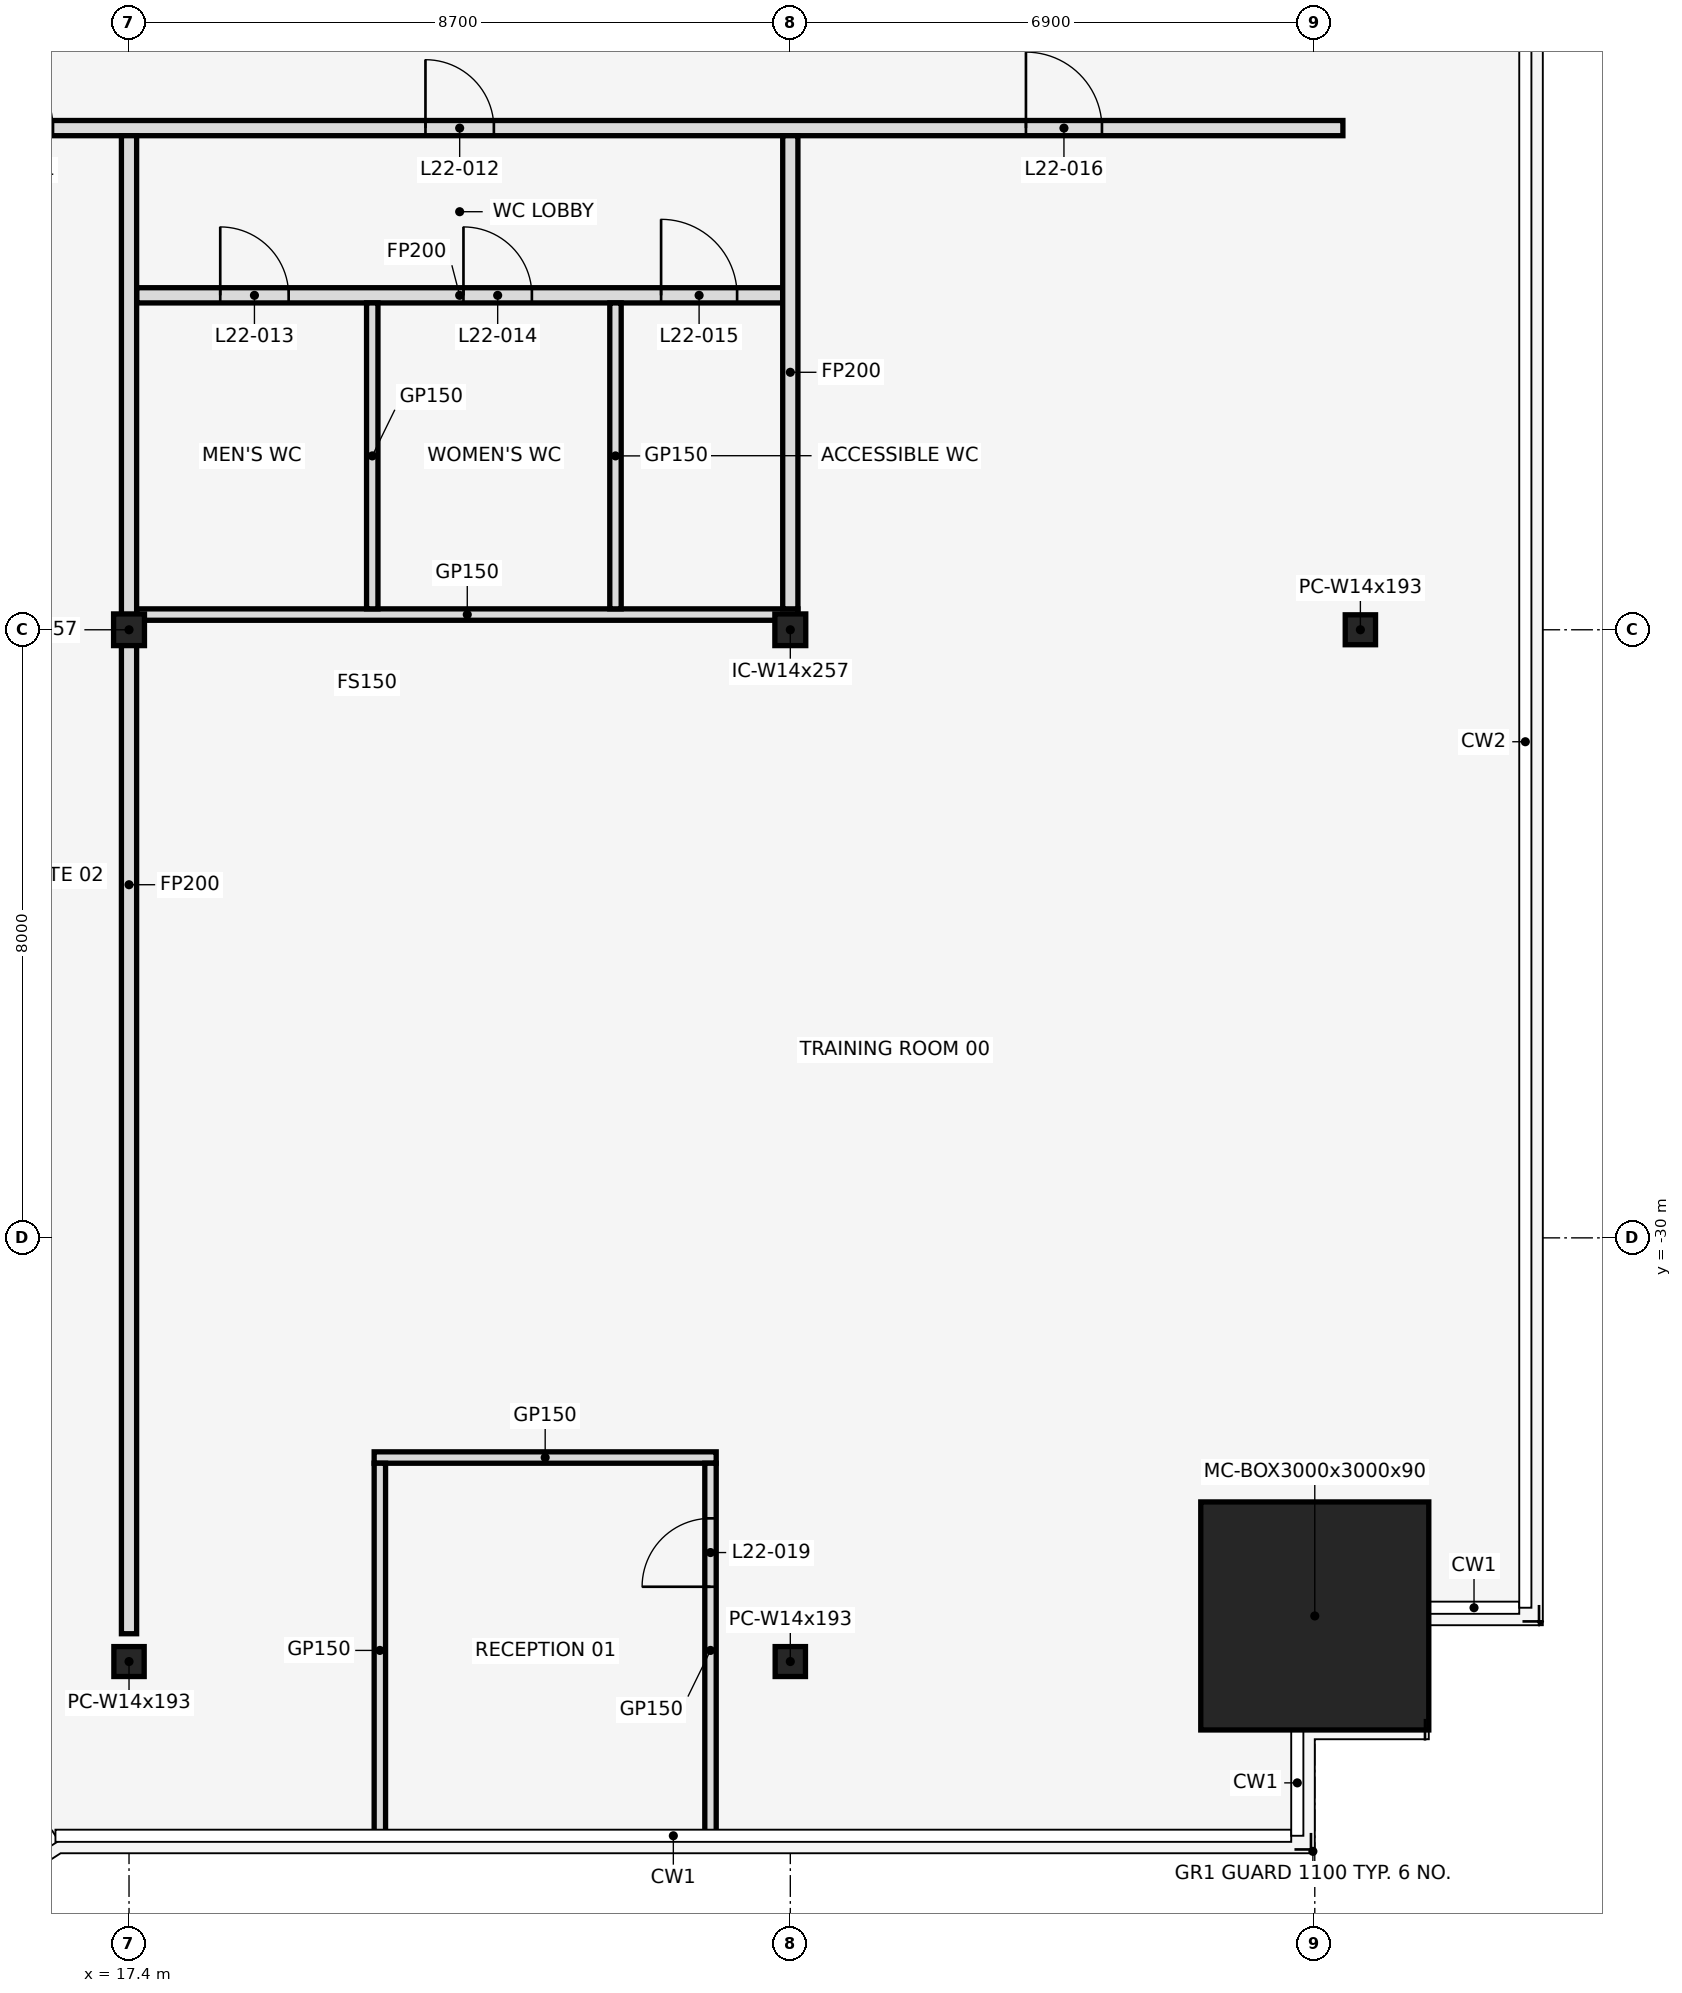
"""IFC4 building model, lengths in metres.
Left out: names, types, materials, properties, quantities, classifications, styles, units other than length and angle.
Written with IfcOpenShell. Run it as: python <this file> out.ifc"""

import sys

from ifc_helpers import new_model, si_unit, direction, frame, frame_2d, origin, origin_2d, place, context, subcontext, project, spatial, rectangle, hollow_rectangle, i_section, extrude, element, fill, save


model = new_model("IFC4")
c1 = context("Model", 3, precision=1e-05, world=origin(), true_north=direction((0.0, 1.0)))
c2 = subcontext(c1, "Body", "Model", "MODEL_VIEW")
j1 = project(units=[si_unit("LENGTHUNIT", "METRE"), si_unit("PLANEANGLEUNIT", "RADIAN")], contexts=[c1])
p1 = place(None, origin())
s1 = spatial("IfcSite", under=j1, at=p1, CompositionType="ELEMENT")
p2 = place(p1, origin())
s2 = spatial("IfcBuilding", under=s1, at=p2, CompositionType="ELEMENT")
p3 = place(p2, frame((0.0, 0.0, 106.3)))
s3 = spatial("IfcBuildingStorey", under=s2, at=p3, CompositionType="ELEMENT", Elevation=106.3)
for number, where, z_axis, x_axis in (
    (1, (17.4, -35.574, 0.0), (0.0, 0.0, 1.0), (1.0, 0.0, 0.0)),
    (2, (26.1, -35.574, 0.0), (0.0, 0.0, 1.0), (1.0, 0.0, 0.0)),
):
    element("IfcColumn", number, at=place(p3, frame(where, z_axis=z_axis, x_axis=x_axis)), inside=s3, PredefinedType="COLUMN", context=c2, shape_type="SweptSolid", body=[
        extrude(i_section(OverallWidth=0.399, OverallDepth=0.394, WebThickness=0.023, FlangeThickness=0.037, at=origin_2d()), origin(), (0.0, 0.0, 1.0), 4.1),
    ])
p4 = place(p3, frame((33.0, -34.974, 0.0), z_axis=(0.0, 0.0, 1.0), x_axis=(1.0, 0.0, 0.0)))
e3 = element("IfcColumn", 3, at=p4, inside=s3, PredefinedType="COLUMN", context=c2, shape_type="SweptSolid", body=[
    extrude(hollow_rectangle(XDim=3.0, YDim=3.0, WallThickness=0.09, at=origin_2d()), origin(), (0.0, 0.0, 1.0), 4.1),
])
p5 = place(p3, frame((33.6, -22.0, 0.0), z_axis=(0.0, 0.0, 1.0), x_axis=(1.0, 0.0, 0.0)))
e4 = element("IfcColumn", 4, at=p5, inside=s3, PredefinedType="COLUMN", context=c2, shape_type="SweptSolid", body=[
    extrude(i_section(OverallWidth=0.399, OverallDepth=0.394, WebThickness=0.023, FlangeThickness=0.037, at=origin_2d()), origin(), (0.0, 0.0, 1.0), 4.1),
])
for number, where, z_axis, x_axis in (
    (5, (17.4, -22.0, 0.0), (0.0, 0.0, 1.0), (1.0, 0.0, 0.0)),
    (6, (26.1, -22.0, 0.0), (0.0, 0.0, 1.0), (1.0, 0.0, 0.0)),
):
    element("IfcColumn", number, at=place(p3, frame(where, z_axis=z_axis, x_axis=x_axis)), inside=s3, PredefinedType="COLUMN", context=c2, shape_type="SweptSolid", body=[
        extrude(i_section(OverallWidth=0.406, OverallDepth=0.417, WebThickness=0.03, FlangeThickness=0.048, at=origin_2d()), origin(), (0.0, 0.0, 1.0), 4.1),
    ])
p6 = place(p3, frame((20.625, -32.89, 0.0), z_axis=(0.0, 0.0, 1.0), x_axis=(1.0, 0.0, 0.0)))
e7 = element("IfcWall", 7, at=p6, inside=s3, PredefinedType="PARTITIONING", context=c2, shape_type="SweptSolid", body=[
    extrude(rectangle(XDim=4.5, YDim=0.15, at=frame_2d((2.25, 0.0))), origin(), (0.0, 0.0, 1.0), 3.018),
])
p7 = place(p3, frame((17.5, -21.8, 0.0), z_axis=(0.0, 0.0, 1.0), x_axis=(1.0, 0.0, 0.0)))
e8 = element("IfcWall", 8, at=p7, inside=s3, PredefinedType="PARTITIONING", context=c2, shape_type="SweptSolid", body=[
    extrude(rectangle(XDim=8.7, YDim=0.15, at=frame_2d((4.35, 0.0))), origin(), (0.0, 0.0, 1.0), 3.018),
])
p8 = place(p3, frame((17.5, -17.6, 0.0), z_axis=(0.0, 0.0, 1.0), x_axis=(1.0, 0.0, 0.0)))
e9 = element("IfcWall", 9, at=p8, inside=s3, PredefinedType="PARTITIONING", context=c2, shape_type="SweptSolid", body=[
    extrude(rectangle(XDim=8.5, YDim=0.2, at=frame_2d((4.25, 0.0))), origin(), (0.0, 0.0, 1.0), 3.018),
])
p9 = place(p8, frame((1.1, 0.0, 0.0)))
e10 = element("IfcOpeningElement", 10, at=p9, cuts=e9, PredefinedType="OPENING", context=c2, shape_type="SweptSolid", body=[
    extrude(rectangle(XDim=0.9, YDim=2.1, at=frame_2d((0.45, 1.05))), frame((0.0, 0.112, 0.0), z_axis=(0.0, -1.0, 0.0), x_axis=(1.0, 0.0, 0.0)), (0.0, 0.0, 1.0), 0.224),
])
p10 = place(p8, frame((4.3, 0.0, 0.0)))
e11 = element("IfcOpeningElement", 11, at=p10, cuts=e9, PredefinedType="OPENING", context=c2, shape_type="SweptSolid", body=[
    extrude(rectangle(XDim=0.9, YDim=2.1, at=frame_2d((0.45, 1.05))), frame((0.0, 0.112, 0.0), z_axis=(0.0, -1.0, 0.0), x_axis=(1.0, 0.0, 0.0)), (0.0, 0.0, 1.0), 0.224),
])
p11 = place(p8, frame((6.9, 0.0, 0.0)))
e12 = element("IfcOpeningElement", 12, at=p11, cuts=e9, PredefinedType="OPENING", context=c2, shape_type="SweptSolid", body=[
    extrude(rectangle(XDim=1.0, YDim=2.1, at=frame_2d((0.5, 1.05))), frame((0.0, 0.112, 0.0), z_axis=(0.0, -1.0, 0.0), x_axis=(1.0, 0.0, 0.0)), (0.0, 0.0, 1.0), 0.224),
])
p12 = place(p3, frame((-33.37, -15.4, 0.0), z_axis=(0.0, 0.0, 1.0), x_axis=(1.0, 0.0, 0.0)))
e13 = element("IfcWall", 13, at=p12, inside=s3, PredefinedType="PARTITIONING", context=c2, shape_type="SweptSolid", body=[
    extrude(rectangle(XDim=66.74, YDim=0.2, at=frame_2d((33.37, 0.0))), origin(), (0.0, 0.0, 1.0), 3.018),
])
p13 = place(p12, frame((4.2, 0.0, 0.0)))
e14 = element("IfcOpeningElement", 14, at=p13, cuts=e13, PredefinedType="OPENING", context=c2, shape_type="SweptSolid", body=[
    extrude(rectangle(XDim=1.8, YDim=2.1, at=frame_2d((0.9, 1.05))), frame((0.0, 0.112, 0.0), z_axis=(0.0, -1.0, 0.0), x_axis=(1.0, 0.0, 0.0)), (0.0, 0.0, 1.0), 0.224),
])
p14 = place(p12, frame((15.47, 0.0, 0.0)))
e15 = element("IfcOpeningElement", 15, at=p14, cuts=e13, PredefinedType="OPENING", context=c2, shape_type="SweptSolid", body=[
    extrude(rectangle(XDim=1.0, YDim=2.1, at=frame_2d((0.5, 1.05))), frame((0.0, 0.112, 0.0), z_axis=(0.0, -1.0, 0.0), x_axis=(1.0, 0.0, 0.0)), (0.0, 0.0, 1.0), 0.224),
])
p15 = place(p12, frame((27.07, 0.0, 0.0)))
e16 = element("IfcOpeningElement", 16, at=p15, cuts=e13, PredefinedType="OPENING", context=c2, shape_type="SweptSolid", body=[
    extrude(rectangle(XDim=1.0, YDim=2.1, at=frame_2d((0.5, 1.05))), frame((0.0, 0.112, 0.0), z_axis=(0.0, -1.0, 0.0), x_axis=(1.0, 0.0, 0.0)), (0.0, 0.0, 1.0), 0.224),
])
p16 = place(p12, frame((39.67, 0.0, 0.0)))
e17 = element("IfcOpeningElement", 17, at=p16, cuts=e13, PredefinedType="OPENING", context=c2, shape_type="SweptSolid", body=[
    extrude(rectangle(XDim=1.8, YDim=2.1, at=frame_2d((0.9, 1.05))), frame((0.0, 0.112, 0.0), z_axis=(0.0, -1.0, 0.0), x_axis=(1.0, 0.0, 0.0)), (0.0, 0.0, 1.0), 0.224),
])
p17 = place(p12, frame((48.77, 0.0, 0.0)))
e18 = element("IfcOpeningElement", 18, at=p17, cuts=e13, PredefinedType="OPENING", context=c2, shape_type="SweptSolid", body=[
    extrude(rectangle(XDim=1.0, YDim=2.1, at=frame_2d((0.5, 1.05))), frame((0.0, 0.112, 0.0), z_axis=(0.0, -1.0, 0.0), x_axis=(1.0, 0.0, 0.0)), (0.0, 0.0, 1.0), 0.224),
])
p18 = place(p12, frame((54.67, 0.0, 0.0)))
e19 = element("IfcOpeningElement", 19, at=p18, cuts=e13, PredefinedType="OPENING", context=c2, shape_type="SweptSolid", body=[
    extrude(rectangle(XDim=0.9, YDim=2.1, at=frame_2d((0.45, 1.05))), frame((0.0, 0.112, 0.0), z_axis=(0.0, -1.0, 0.0), x_axis=(1.0, 0.0, 0.0)), (0.0, 0.0, 1.0), 0.224),
])
p19 = place(p12, frame((62.57, 0.0, 0.0)))
e20 = element("IfcOpeningElement", 20, at=p19, cuts=e13, PredefinedType="OPENING", context=c2, shape_type="SweptSolid", body=[
    extrude(rectangle(XDim=1.0, YDim=2.1, at=frame_2d((0.5, 1.05))), frame((0.0, 0.112, 0.0), z_axis=(0.0, -1.0, 0.0), x_axis=(1.0, 0.0, 0.0)), (0.0, 0.0, 1.0), 0.224),
])
p20 = place(p3, frame((17.4, -35.208, 0.0), z_axis=(0.0, 0.0, 1.0), x_axis=(0.0, 1.0, 0.0)))
e21 = element("IfcWall", 21, at=p20, inside=s3, PredefinedType="PARTITIONING", context=c2, shape_type="SweptSolid", body=[
    extrude(rectangle(XDim=19.708, YDim=0.2, at=frame_2d((9.854, 0.0))), origin(), (0.0, 0.0, 1.0), 3.018),
])
p21 = place(p3, frame((20.6, -21.725, 0.0), z_axis=(0.0, 0.0, 1.0), x_axis=(0.0, 1.0, 0.0)))
e22 = element("IfcWall", 22, at=p21, inside=s3, PredefinedType="PARTITIONING", context=c2, shape_type="SweptSolid", body=[
    extrude(rectangle(XDim=4.025, YDim=0.15, at=frame_2d((2.013, 0.0))), origin(), (0.0, 0.0, 1.0), 3.018),
])
p22 = place(p3, frame((20.7, -37.89, 0.0), z_axis=(0.0, 0.0, 1.0), x_axis=(0.0, 1.0, 0.0)))
e23 = element("IfcWall", 23, at=p22, inside=s3, PredefinedType="PARTITIONING", context=c2, shape_type="SweptSolid", body=[
    extrude(rectangle(XDim=4.925, YDim=0.15, at=frame_2d((2.462, 0.0))), origin(), (0.0, 0.0, 1.0), 3.018),
])
p23 = place(p3, frame((23.8, -21.725, 0.0), z_axis=(0.0, 0.0, 1.0), x_axis=(0.0, 1.0, 0.0)))
e24 = element("IfcWall", 24, at=p23, inside=s3, PredefinedType="PARTITIONING", context=c2, shape_type="SweptSolid", body=[
    extrude(rectangle(XDim=4.025, YDim=0.15, at=frame_2d((2.013, 0.0))), origin(), (0.0, 0.0, 1.0), 3.018),
])
p24 = place(p3, frame((25.05, -37.89, 0.0), z_axis=(0.0, 0.0, 1.0), x_axis=(0.0, 1.0, 0.0)))
e25 = element("IfcWall", 25, at=p24, inside=s3, PredefinedType="PARTITIONING", context=c2, shape_type="SweptSolid", body=[
    extrude(rectangle(XDim=4.925, YDim=0.15, at=frame_2d((2.462, 0.0))), origin(), (0.0, 0.0, 1.0), 3.018),
])
p25 = place(p24, frame((3.3, 0.0, 0.0)))
e26 = element("IfcOpeningElement", 26, at=p25, cuts=e25, PredefinedType="OPENING", context=c2, shape_type="SweptSolid", body=[
    extrude(rectangle(XDim=0.9, YDim=2.1, at=frame_2d((0.45, 1.05))), frame((0.0, 0.087, 0.0), z_axis=(0.0, -1.0, 0.0), x_axis=(1.0, 0.0, 0.0)), (0.0, 0.0, 1.0), 0.174),
])
p26 = place(p3, frame((26.1, -21.725, 0.0), z_axis=(0.0, 0.0, 1.0), x_axis=(0.0, 1.0, 0.0)))
e27 = element("IfcWall", 27, at=p26, inside=s3, PredefinedType="PARTITIONING", context=c2, shape_type="SweptSolid", body=[
    extrude(rectangle(XDim=6.225, YDim=0.2, at=frame_2d((3.113, 0.0))), origin(), (0.0, 0.0, 1.0), 3.018),
])
p27 = place(p18, frame((0.9, 0.0, 0.0), z_axis=(0.0, 0.0, 1.0), x_axis=(-1.0, 0.0, 0.0)))
e28 = element("IfcDoor", 28, at=p27, inside=s3, OperationType="SINGLE_SWING_RIGHT", PredefinedType="DOOR", context=c2, shape_type="SweptSolid", body=[
    extrude(rectangle(XDim=0.9, YDim=2.1, at=frame_2d((0.45, 1.05))), frame((0.0, 0.025, 0.0), z_axis=(0.0, -1.0, 0.0), x_axis=(1.0, 0.0, 0.0)), (0.0, 0.0, 1.0), 0.05),
])
fill(e19, e28)
p28 = place(p9, frame((0.9, 0.0, 0.0), z_axis=(0.0, 0.0, 1.0), x_axis=(-1.0, 0.0, 0.0)))
e29 = element("IfcDoor", 29, at=p28, inside=s3, OperationType="SINGLE_SWING_LEFT", PredefinedType="DOOR", context=c2, shape_type="SweptSolid", body=[
    extrude(rectangle(XDim=0.9, YDim=2.1, at=frame_2d((0.45, 1.05))), frame((0.0, 0.025, 0.0), z_axis=(0.0, -1.0, 0.0), x_axis=(1.0, 0.0, 0.0)), (0.0, 0.0, 1.0), 0.05),
])
fill(e10, e29)
p29 = place(p10, frame((0.9, 0.0, 0.0), z_axis=(0.0, 0.0, 1.0), x_axis=(-1.0, 0.0, 0.0)))
e30 = element("IfcDoor", 30, at=p29, inside=s3, OperationType="SINGLE_SWING_RIGHT", PredefinedType="DOOR", context=c2, shape_type="SweptSolid", body=[
    extrude(rectangle(XDim=0.9, YDim=2.1, at=frame_2d((0.45, 1.05))), frame((0.0, 0.025, 0.0), z_axis=(0.0, -1.0, 0.0), x_axis=(1.0, 0.0, 0.0)), (0.0, 0.0, 1.0), 0.05),
])
fill(e11, e30)
p30 = place(p11, frame((1.0, 0.0, 0.0), z_axis=(0.0, 0.0, 1.0), x_axis=(-1.0, 0.0, 0.0)))
e31 = element("IfcDoor", 31, at=p30, inside=s3, OperationType="SINGLE_SWING_RIGHT", PredefinedType="DOOR", context=c2, shape_type="SweptSolid", body=[
    extrude(rectangle(XDim=1.0, YDim=2.1, at=frame_2d((0.5, 1.05))), frame((0.0, 0.025, 0.0), z_axis=(0.0, -1.0, 0.0), x_axis=(1.0, 0.0, 0.0)), (0.0, 0.0, 1.0), 0.05),
])
fill(e12, e31)
p31 = place(p19, frame((1.0, 0.0, 0.0), z_axis=(0.0, 0.0, 1.0), x_axis=(-1.0, 0.0, 0.0)))
e32 = element("IfcDoor", 32, at=p31, inside=s3, OperationType="SINGLE_SWING_LEFT", PredefinedType="DOOR", context=c2, shape_type="SweptSolid", body=[
    extrude(rectangle(XDim=1.0, YDim=2.1, at=frame_2d((0.5, 1.05))), frame((0.0, 0.025, 0.0), z_axis=(0.0, -1.0, 0.0), x_axis=(1.0, 0.0, 0.0)), (0.0, 0.0, 1.0), 0.05),
])
fill(e20, e32)
p32 = place(p25, origin())
e33 = element("IfcDoor", 33, at=p32, inside=s3, OperationType="SINGLE_SWING_LEFT", PredefinedType="DOOR", context=c2, shape_type="SweptSolid", body=[
    extrude(rectangle(XDim=0.9, YDim=2.1, at=frame_2d((0.45, 1.05))), frame((0.0, 0.025, 0.0), z_axis=(0.0, -1.0, 0.0), x_axis=(1.0, 0.0, 0.0)), (0.0, 0.0, 1.0), 0.05),
])
fill(e26, e33)
save(model, sys.argv[1])
